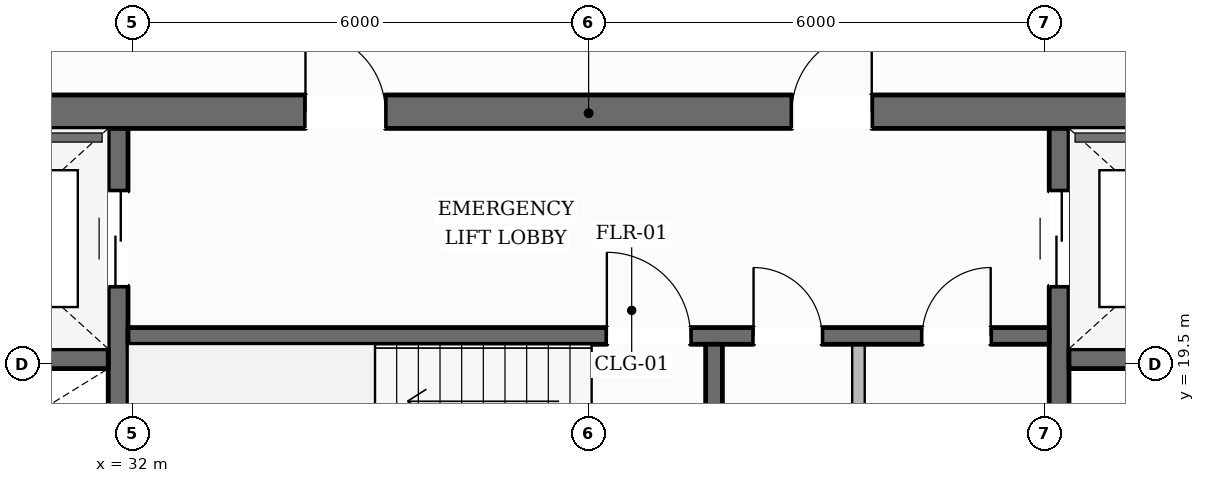
"""IFC4 building model, lengths in metres.
Left out: names, types, materials, properties, quantities, classifications, styles, units other than length and angle.
Written with IfcOpenShell. Run it as: python <this file> out.ifc"""

import sys

from ifc_helpers import new_model, si_unit, direction, frame, frame_2d, origin, place, context, subcontext, project, spatial, rectangle, extrude, element, fill, save


model = new_model("IFC4")
c1 = context("Model", 3, precision=1e-05, world=origin(), true_north=direction((0.0, 1.0)))
c2 = subcontext(c1, "Body", "Model", "MODEL_VIEW")
j1 = project(units=[si_unit("LENGTHUNIT", "METRE"), si_unit("PLANEANGLEUNIT", "RADIAN")], contexts=[c1])
p1 = place(None, origin())
s1 = spatial("IfcSite", under=j1, at=p1, CompositionType="ELEMENT")
p2 = place(p1, origin())
s2 = spatial("IfcBuilding", under=s1, at=p2, CompositionType="ELEMENT")
p3 = place(p2, frame((0.0, 0.0, 226.6)))
s3 = spatial("IfcBuildingStorey", under=s2, at=p3, CompositionType="ELEMENT", Elevation=226.6)
p4 = place(p3, frame((28.04, 22.82, 0.0), z_axis=(0.0, 0.0, 1.0), x_axis=(1.0, 0.0, 0.0)))
e1 = element("IfcWall", 1, at=p4, inside=s3, PredefinedType="SOLIDWALL", context=c2, shape_type="SweptSolid", body=[
    extrude(rectangle(XDim=19.92, YDim=0.44, at=frame_2d((9.96, 0.0))), origin(), (0.0, 0.0, 1.0), 3.6),
])
p5 = place(p4, frame((6.235, 0.0, 0.0)))
e2 = element("IfcOpeningElement", 2, at=p5, cuts=e1, PredefinedType="OPENING", context=c2, shape_type="SweptSolid", body=[
    extrude(rectangle(XDim=1.05, YDim=2.15, at=frame_2d((0.525, 1.075))), frame((0.0, 0.23, 0.0), z_axis=(0.0, -1.0, 0.0), x_axis=(1.0, 0.0, 0.0)), (0.0, 0.0, 1.0), 0.46),
])
p6 = place(p4, frame((12.635, 0.0, 0.0)))
e3 = element("IfcOpeningElement", 3, at=p6, cuts=e1, PredefinedType="OPENING", context=c2, shape_type="SweptSolid", body=[
    extrude(rectangle(XDim=1.05, YDim=2.15, at=frame_2d((0.525, 1.075))), frame((0.0, 0.23, 0.0), z_axis=(0.0, -1.0, 0.0), x_axis=(1.0, 0.0, 0.0)), (0.0, 0.0, 1.0), 0.46),
])
p7 = place(p3, frame((31.81, 9.6, 0.0), z_axis=(0.0, 0.0, 1.0), x_axis=(0.0, 1.0, 0.0)))
e4 = element("IfcWall", 4, at=p7, inside=s3, PredefinedType="SHEAR", context=c2, shape_type="SweptSolid", body=[
    extrude(rectangle(XDim=13.0, YDim=0.26, at=frame_2d((6.5, 0.0))), origin(), (0.0, 0.0, 1.0), 3.6),
])
p8 = place(p7, frame((10.925, 0.0, 0.0)))
e5 = element("IfcOpeningElement", 5, at=p8, cuts=e4, PredefinedType="OPENING", context=c2, shape_type="SweptSolid", body=[
    extrude(rectangle(XDim=1.25, YDim=2.25, at=frame_2d((0.625, 1.125))), frame((0.0, 0.14, 0.0), z_axis=(0.0, -1.0, 0.0), x_axis=(1.0, 0.0, 0.0)), (0.0, 0.0, 1.0), 0.28),
])
p9 = place(p3, frame((44.19, 9.6, 0.0), z_axis=(0.0, 0.0, 1.0), x_axis=(0.0, 1.0, 0.0)))
e6 = element("IfcWall", 6, at=p9, inside=s3, PredefinedType="SHEAR", context=c2, shape_type="SweptSolid", body=[
    extrude(rectangle(XDim=13.0, YDim=0.26, at=frame_2d((6.5, 0.0))), origin(), (0.0, 0.0, 1.0), 3.6),
])
p10 = place(p9, frame((10.925, 0.0, 0.0)))
e7 = element("IfcOpeningElement", 7, at=p10, cuts=e6, PredefinedType="OPENING", context=c2, shape_type="SweptSolid", body=[
    extrude(rectangle(XDim=1.25, YDim=2.25, at=frame_2d((0.625, 1.125))), frame((0.0, 0.14, 0.0), z_axis=(0.0, -1.0, 0.0), x_axis=(1.0, 0.0, 0.0)), (0.0, 0.0, 1.0), 0.28),
])
for number, where, z_axis, x_axis in (
    (8, (28.48, 19.57, 0.0), (0.0, 0.0, 1.0), (1.0, 0.0, 0.0)),
    (9, (44.32, 19.57, 0.0), (0.0, 0.0, 1.0), (1.0, 0.0, 0.0)),
):
    element("IfcWall", number, at=place(p3, frame(where, z_axis=z_axis, x_axis=x_axis)), inside=s3, PredefinedType="SHEAR", context=c2, shape_type="SweptSolid", body=[
        extrude(rectangle(XDim=3.2, YDim=0.26, at=frame_2d((1.6, 0.0))), origin(), (0.0, 0.0, 1.0), 3.6),
    ])
p11 = place(p3, frame((31.94, 19.87, 0.0), z_axis=(0.0, 0.0, 1.0), x_axis=(1.0, 0.0, 0.0)))
e10 = element("IfcWall", 10, at=p11, inside=s3, PredefinedType="SOLIDWALL", context=c2, shape_type="SweptSolid", body=[
    extrude(rectangle(XDim=12.12, YDim=0.22, at=frame_2d((6.06, 0.0))), origin(), (0.0, 0.0, 1.0), 3.6),
])
p12 = place(p11, frame((6.3, 0.0, 0.0)))
e11 = element("IfcOpeningElement", 11, at=p12, cuts=e10, PredefinedType="OPENING", context=c2, shape_type="SweptSolid", body=[
    extrude(rectangle(XDim=1.1, YDim=2.15, at=frame_2d((0.55, 1.075))), frame((0.0, 0.12, 0.0), z_axis=(0.0, -1.0, 0.0), x_axis=(1.0, 0.0, 0.0)), (0.0, 0.0, 1.0), 0.24),
])
p13 = place(p11, frame((8.23, 0.0, 0.0)))
e12 = element("IfcOpeningElement", 12, at=p13, cuts=e10, PredefinedType="OPENING", context=c2, shape_type="SweptSolid", body=[
    extrude(rectangle(XDim=0.9, YDim=2.1, at=frame_2d((0.45, 1.05))), frame((0.0, 0.12, 0.0), z_axis=(0.0, -1.0, 0.0), x_axis=(1.0, 0.0, 0.0)), (0.0, 0.0, 1.0), 0.24),
])
p14 = place(p11, frame((10.45, 0.0, 0.0)))
e13 = element("IfcOpeningElement", 13, at=p14, cuts=e10, PredefinedType="OPENING", context=c2, shape_type="SweptSolid", body=[
    extrude(rectangle(XDim=0.9, YDim=2.1, at=frame_2d((0.45, 1.05))), frame((0.0, 0.12, 0.0), z_axis=(0.0, -1.0, 0.0), x_axis=(1.0, 0.0, 0.0)), (0.0, 0.0, 1.0), 0.24),
])
p15 = place(p3, frame((39.65, 16.56, 0.0), z_axis=(0.0, 0.0, 1.0), x_axis=(0.0, 1.0, 0.0)))
e14 = element("IfcWall", 14, at=p15, inside=s3, PredefinedType="SOLIDWALL", context=c2, shape_type="SweptSolid", body=[
    extrude(rectangle(XDim=3.2, YDim=0.22, at=frame_2d((1.6, 0.0))), origin(), (0.0, 0.0, 1.0), 3.6),
])
p16 = place(p3, frame((14.425, 10.865, 0.0), z_axis=(0.0, 0.0, 1.0), x_axis=(0.497768108872, 0.867310157781, 0.0)))
e15 = element("IfcWall", 15, at=p16, inside=s3, PredefinedType="STANDARD", context=c2, shape_type="SweptSolid", body=[
    extrude(rectangle(XDim=39.647, YDim=0.35, at=frame_2d((19.823, 0.0))), origin(), (0.0, 0.0, 1.0), 3.132),
])
p17 = place(p16, frame((35.221, 0.0, 0.65)))
e16 = element("IfcOpeningElement", 16, at=p17, cuts=e15, PredefinedType="OPENING", context=c2, shape_type="SweptSolid", body=[
    extrude(rectangle(XDim=1.45, YDim=1.75, at=frame_2d((0.725, 0.875))), frame((0.0, 0.185, 0.0), z_axis=(0.0, -1.0, 0.0), x_axis=(1.0, 0.0, 0.0)), (0.0, 0.0, 1.0), 0.37),
])
p18 = place(p16, frame((28.771, 0.0, 0.65)))
e17 = element("IfcOpeningElement", 17, at=p18, cuts=e15, PredefinedType="OPENING", context=c2, shape_type="SweptSolid", body=[
    extrude(rectangle(XDim=1.45, YDim=1.75, at=frame_2d((0.725, 0.875))), frame((0.0, 0.185, 0.0), z_axis=(0.0, -1.0, 0.0), x_axis=(1.0, 0.0, 0.0)), (0.0, 0.0, 1.0), 0.37),
])
p19 = place(p16, frame((15.872, 0.0, 0.65)))
e18 = element("IfcOpeningElement", 18, at=p19, cuts=e15, PredefinedType="OPENING", context=c2, shape_type="SweptSolid", body=[
    extrude(rectangle(XDim=1.45, YDim=1.75, at=frame_2d((0.725, 0.875))), frame((0.0, 0.185, 0.0), z_axis=(0.0, -1.0, 0.0), x_axis=(1.0, 0.0, 0.0)), (0.0, 0.0, 1.0), 0.37),
])
p20 = place(p16, frame((9.423, 0.0, 0.65)))
e19 = element("IfcOpeningElement", 19, at=p20, cuts=e15, PredefinedType="OPENING", context=c2, shape_type="SweptSolid", body=[
    extrude(rectangle(XDim=1.45, YDim=1.75, at=frame_2d((0.725, 0.875))), frame((0.0, 0.185, 0.0), z_axis=(0.0, -1.0, 0.0), x_axis=(1.0, 0.0, 0.0)), (0.0, 0.0, 1.0), 0.37),
])
p21 = place(p16, frame((2.973, 0.0, 0.65)))
e20 = element("IfcOpeningElement", 20, at=p21, cuts=e15, PredefinedType="OPENING", context=c2, shape_type="SweptSolid", body=[
    extrude(rectangle(XDim=1.45, YDim=1.75, at=frame_2d((0.725, 0.875))), frame((0.0, 0.185, 0.0), z_axis=(0.0, -1.0, 0.0), x_axis=(1.0, 0.0, 0.0)), (0.0, 0.0, 1.0), 0.37),
])
p22 = place(p3, frame((41.74, 45.312, 0.0), z_axis=(0.0, 0.0, 1.0), x_axis=(0.491560367125, -0.870843502285, 0.0)))
e21 = element("IfcWall", 21, at=p22, inside=s3, PredefinedType="STANDARD", context=c2, shape_type="SweptSolid", body=[
    extrude(rectangle(XDim=39.17, YDim=0.35, at=frame_2d((19.585, 0.0))), origin(), (0.0, 0.0, 1.0), 3.132),
])
p23 = place(p22, frame((34.788, 0.0, 0.65)))
e22 = element("IfcOpeningElement", 22, at=p23, cuts=e21, PredefinedType="OPENING", context=c2, shape_type="SweptSolid", body=[
    extrude(rectangle(XDim=1.45, YDim=1.75, at=frame_2d((0.725, 0.875))), frame((0.0, 0.185, 0.0), z_axis=(0.0, -1.0, 0.0), x_axis=(1.0, 0.0, 0.0)), (0.0, 0.0, 1.0), 0.37),
])
p24 = place(p22, frame((28.419, 0.0, 0.65)))
e23 = element("IfcOpeningElement", 23, at=p24, cuts=e21, PredefinedType="OPENING", context=c2, shape_type="SweptSolid", body=[
    extrude(rectangle(XDim=1.45, YDim=1.75, at=frame_2d((0.725, 0.875))), frame((0.0, 0.185, 0.0), z_axis=(0.0, -1.0, 0.0), x_axis=(1.0, 0.0, 0.0)), (0.0, 0.0, 1.0), 0.37),
])
p25 = place(p22, frame((15.68, 0.0, 0.65)))
e24 = element("IfcOpeningElement", 24, at=p25, cuts=e21, PredefinedType="OPENING", context=c2, shape_type="SweptSolid", body=[
    extrude(rectangle(XDim=1.45, YDim=1.75, at=frame_2d((0.725, 0.875))), frame((0.0, 0.185, 0.0), z_axis=(0.0, -1.0, 0.0), x_axis=(1.0, 0.0, 0.0)), (0.0, 0.0, 1.0), 0.37),
])
p26 = place(p22, frame((9.311, 0.0, 0.65)))
e25 = element("IfcOpeningElement", 25, at=p26, cuts=e21, PredefinedType="OPENING", context=c2, shape_type="SweptSolid", body=[
    extrude(rectangle(XDim=1.45, YDim=1.75, at=frame_2d((0.725, 0.875))), frame((0.0, 0.185, 0.0), z_axis=(0.0, -1.0, 0.0), x_axis=(1.0, 0.0, 0.0)), (0.0, 0.0, 1.0), 0.37),
])
p27 = place(p22, frame((2.942, 0.0, 0.65)))
e26 = element("IfcOpeningElement", 26, at=p27, cuts=e21, PredefinedType="OPENING", context=c2, shape_type="SweptSolid", body=[
    extrude(rectangle(XDim=1.45, YDim=1.75, at=frame_2d((0.725, 0.875))), frame((0.0, 0.185, 0.0), z_axis=(0.0, -1.0, 0.0), x_axis=(1.0, 0.0, 0.0)), (0.0, 0.0, 1.0), 0.37),
])
p28 = place(p3, frame((41.55, 16.56, 0.0), z_axis=(0.0, 0.0, 1.0), x_axis=(0.0, 1.0, 0.0)))
e27 = element("IfcWall", 27, at=p28, inside=s3, PredefinedType="PARTITIONING", context=c2, shape_type="SweptSolid", body=[
    extrude(rectangle(XDim=3.2, YDim=0.165, at=frame_2d((1.6, 0.0))), origin(), (0.0, 0.0, 1.0), 3.6),
])
p29 = place(p12, origin())
e28 = element("IfcDoor", 28, at=p29, inside=s3, OperationType="SINGLE_SWING_LEFT", PredefinedType="DOOR", context=c2, shape_type="SweptSolid", body=[
    extrude(rectangle(XDim=1.1, YDim=2.15, at=frame_2d((0.55, 1.075))), frame((0.0, 0.025, 0.0), z_axis=(0.0, -1.0, 0.0), x_axis=(1.0, 0.0, 0.0)), (0.0, 0.0, 1.0), 0.05),
])
fill(e11, e28)
p30 = place(p5, origin())
e29 = element("IfcDoor", 29, at=p30, inside=s3, OperationType="SINGLE_SWING_LEFT", PredefinedType="DOOR", context=c2, shape_type="SweptSolid", body=[
    extrude(rectangle(XDim=1.05, YDim=2.15, at=frame_2d((0.525, 1.075))), frame((0.0, 0.025, 0.0), z_axis=(0.0, -1.0, 0.0), x_axis=(1.0, 0.0, 0.0)), (0.0, 0.0, 1.0), 0.05),
])
fill(e2, e29)
p31 = place(p6, origin())
e30 = element("IfcDoor", 30, at=p31, inside=s3, OperationType="SINGLE_SWING_RIGHT", PredefinedType="DOOR", context=c2, shape_type="SweptSolid", body=[
    extrude(rectangle(XDim=1.05, YDim=2.15, at=frame_2d((0.525, 1.075))), frame((0.0, 0.025, 0.0), z_axis=(0.0, -1.0, 0.0), x_axis=(1.0, 0.0, 0.0)), (0.0, 0.0, 1.0), 0.05),
])
fill(e3, e30)
p32 = place(p8, origin())
e31 = element("IfcDoor", 31, at=p32, inside=s3, OperationType="DOUBLE_DOOR_SLIDING", PredefinedType="DOOR", context=c2, shape_type="SweptSolid", body=[
    extrude(rectangle(XDim=1.25, YDim=2.25, at=frame_2d((0.625, 1.125))), frame((0.0, 0.025, 0.0), z_axis=(0.0, -1.0, 0.0), x_axis=(1.0, 0.0, 0.0)), (0.0, 0.0, 1.0), 0.05),
])
fill(e5, e31)
p33 = place(p10, origin())
e32 = element("IfcDoor", 32, at=p33, inside=s3, OperationType="DOUBLE_DOOR_SLIDING", PredefinedType="DOOR", context=c2, shape_type="SweptSolid", body=[
    extrude(rectangle(XDim=1.25, YDim=2.25, at=frame_2d((0.625, 1.125))), frame((0.0, 0.025, 0.0), z_axis=(0.0, -1.0, 0.0), x_axis=(1.0, 0.0, 0.0)), (0.0, 0.0, 1.0), 0.05),
])
fill(e7, e32)
p34 = place(p13, origin())
e33 = element("IfcDoor", 33, at=p34, inside=s3, OperationType="SINGLE_SWING_LEFT", PredefinedType="DOOR", context=c2, shape_type="SweptSolid", body=[
    extrude(rectangle(XDim=0.9, YDim=2.1, at=frame_2d((0.45, 1.05))), frame((0.0, 0.025, 0.0), z_axis=(0.0, -1.0, 0.0), x_axis=(1.0, 0.0, 0.0)), (0.0, 0.0, 1.0), 0.05),
])
fill(e12, e33)
p35 = place(p14, origin())
e34 = element("IfcDoor", 34, at=p35, inside=s3, OperationType="SINGLE_SWING_RIGHT", PredefinedType="DOOR", context=c2, shape_type="SweptSolid", body=[
    extrude(rectangle(XDim=0.9, YDim=2.1, at=frame_2d((0.45, 1.05))), frame((0.0, 0.025, 0.0), z_axis=(0.0, -1.0, 0.0), x_axis=(1.0, 0.0, 0.0)), (0.0, 0.0, 1.0), 0.05),
])
fill(e13, e34)
save(model, sys.argv[1])
